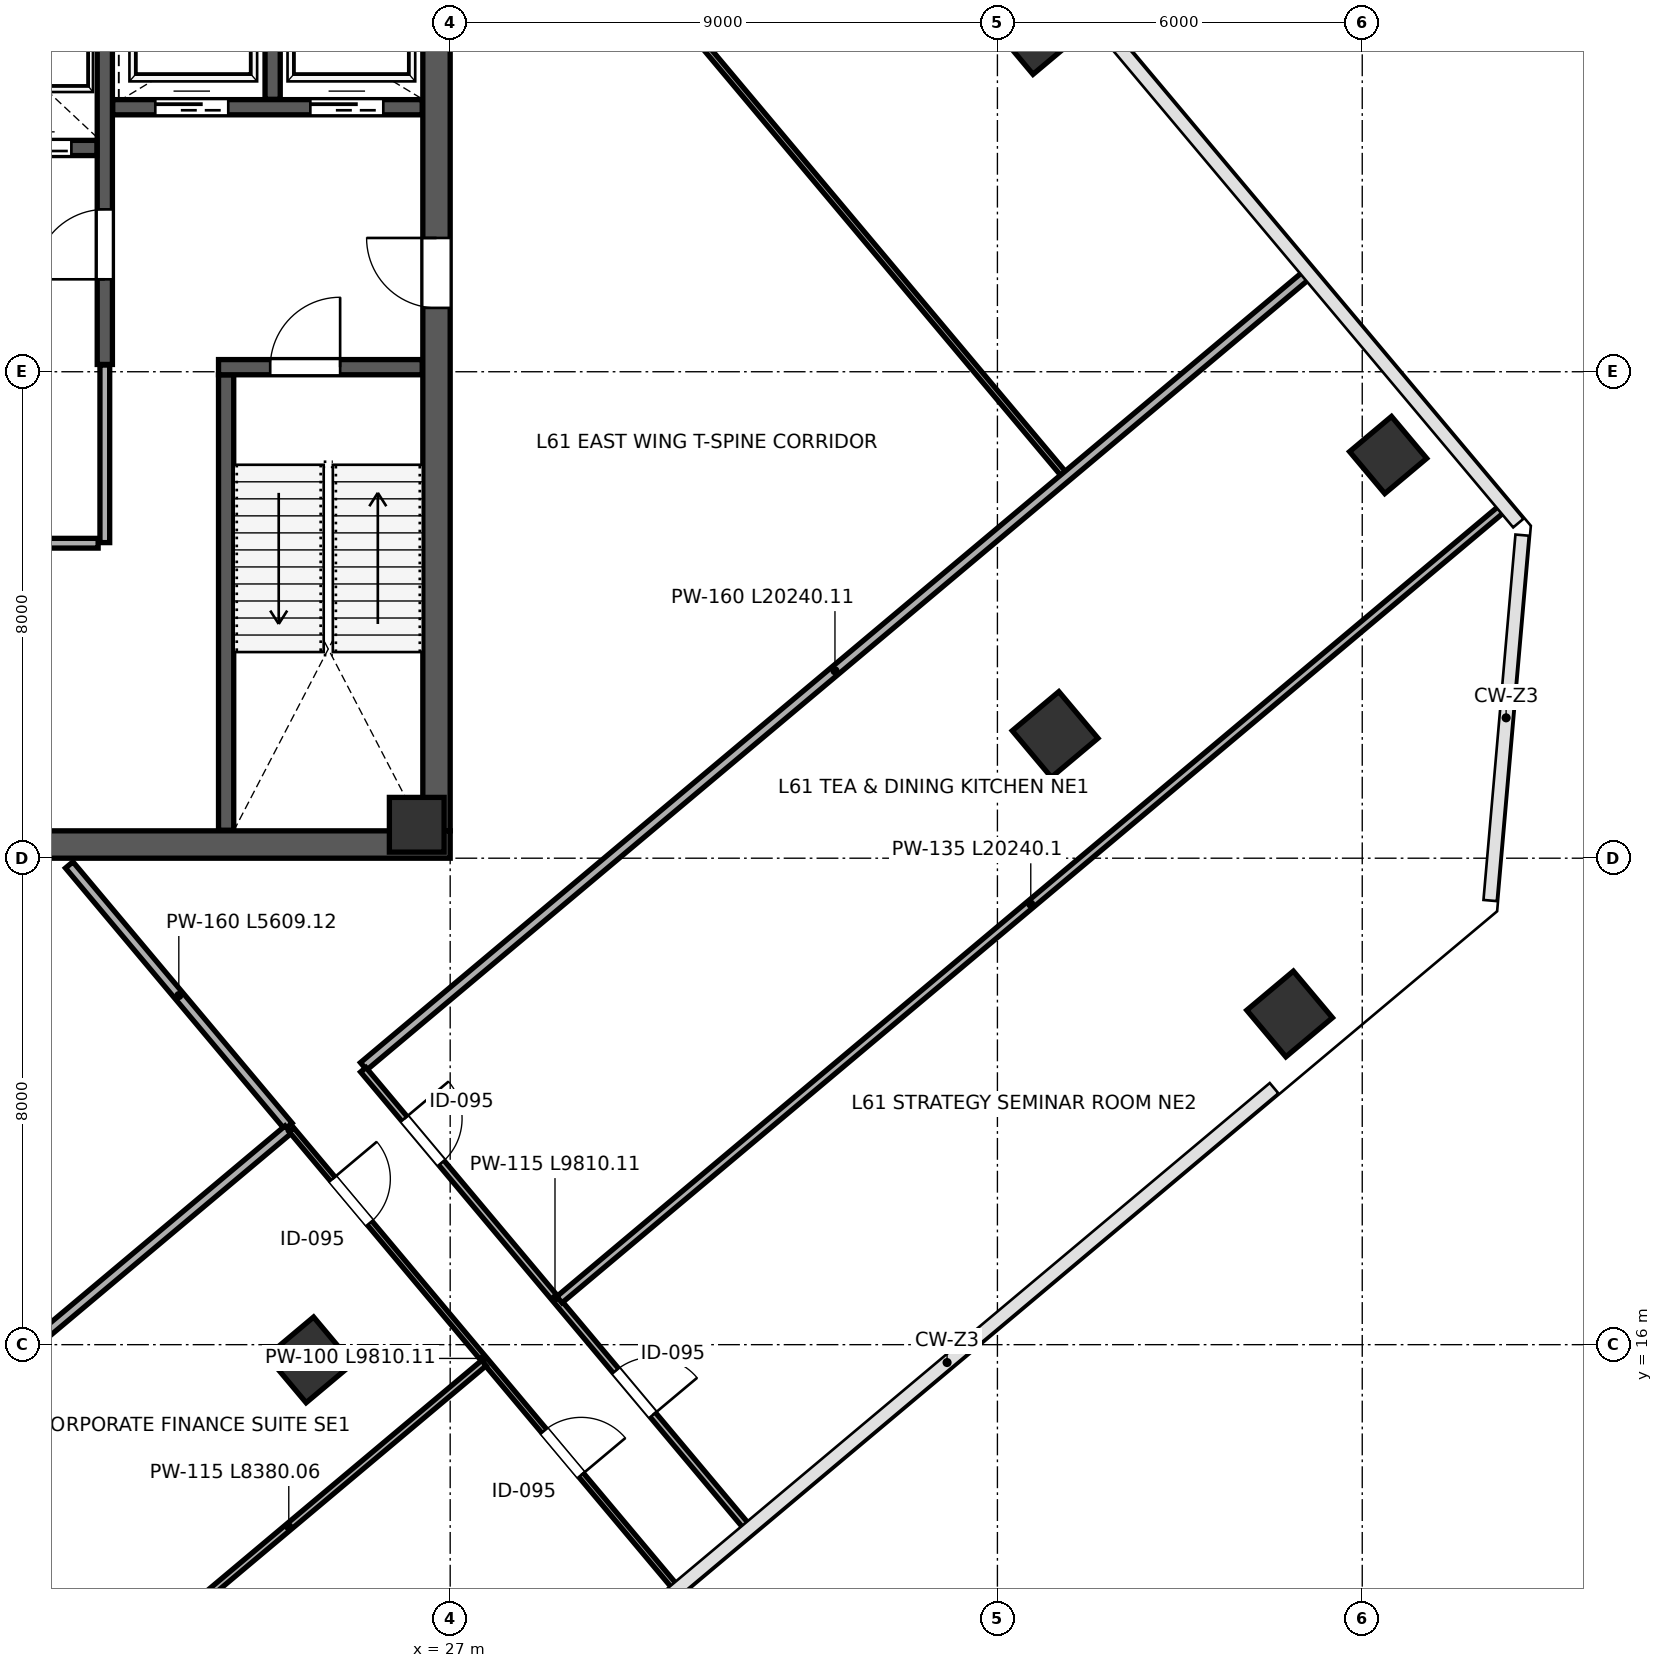
"""IFC4 building model, lengths in metres.
Left out: names, types, materials, properties, quantities, classifications, styles, units other than length and angle.
Written with IfcOpenShell. Run it as: python <this file> out.ifc"""

import sys

from ifc_helpers import new_model, si_unit, direction, frame, frame_2d, origin, origin_2d, place, context, subcontext, project, spatial, rectangle, extrude, source, transform, mapped, element, fill, save


model = new_model("IFC4")
c1 = context("Model", 3, precision=1e-05, world=origin(), true_north=direction((0.0, 1.0)))
c2 = subcontext(c1, "Body", "Model", "MODEL_VIEW")
j1 = project(units=[si_unit("LENGTHUNIT", "METRE"), si_unit("PLANEANGLEUNIT", "RADIAN")], contexts=[c1])
p1 = place(None, origin())
s1 = spatial("IfcSite", under=j1, at=p1, CompositionType="ELEMENT")
p2 = place(p1, origin())
s2 = spatial("IfcBuilding", under=s1, at=p2, CompositionType="ELEMENT")
p3 = place(p2, frame((0.0, 0.0, 271.0)))
s3 = spatial("IfcBuildingStorey", under=s2, at=p3, CompositionType="ELEMENT", Elevation=271.0)
m1 = source(origin(), c2, "Body", "SweptSolid", [
    extrude(rectangle(XDim=0.9, YDim=0.9, at=origin_2d()), origin(), (0.0, 0.0, 1.0), 4.198),
])
p4 = place(p3, frame((26.45, 24.55, 0.001), z_axis=(0.0, 0.0, 1.0), x_axis=(1.0, 0.0, 0.0)))
e1 = element("IfcColumn", 1, at=p4, inside=s3, PredefinedType="COLUMN", context=c2, shape_type="MappedRepresentation", body=[
    mapped(m1, transform((0.0, 0.0, 0.0), scale=1.0)),
])
m2 = source(origin(), c2, "Body", "SweptSolid", [
    extrude(rectangle(XDim=0.9, YDim=0.9, at=origin_2d()), origin(), (0.0, 0.0, 1.0), 4.198),
])
p5 = place(p3, frame((36.641, 37.525, 0.001), z_axis=(0.0, 0.0, 1.0), x_axis=(-0.642787609687, 0.766044443119, 0.0)))
e2 = element("IfcColumn", 2, at=p5, inside=s3, PredefinedType="COLUMN", context=c2, shape_type="MappedRepresentation", body=[
    mapped(m2, transform((0.0, 0.0, 0.0), scale=1.0)),
])
m3 = source(origin(), c2, "Body", "SweptSolid", [
    extrude(rectangle(XDim=1.0, YDim=1.0, at=origin_2d()), origin(), (0.0, 0.0, 1.0), 4.198),
])
for number, where, z_axis, x_axis in (
    (3, (24.692, 15.75, 0.001), (0.0, 0.0, 1.0), (-0.643, 0.766, 0.0)),
    (4, (36.949, 26.035, 0.001), (0.0, 0.0, 1.0), (-0.643, 0.766, 0.0)),
):
    element("IfcColumn", number, at=place(p3, frame(where, z_axis=z_axis, x_axis=x_axis)), inside=s3, PredefinedType="COLUMN", context=c2, shape_type="MappedRepresentation", body=[
        mapped(m3, transform((0.0, 0.0, 0.0), scale=1.0)),
    ])
p6 = place(p3, frame((42.426, 30.631, 0.001), z_axis=(0.0, 0.0, 1.0), x_axis=(-0.642787609687, 0.766044443119, 0.0)))
e5 = element("IfcColumn", 5, at=p6, inside=s3, PredefinedType="COLUMN", context=c2, shape_type="MappedRepresentation", body=[
    mapped(m2, transform((0.0, 0.0, 0.0), scale=1.0)),
])
m4 = source(origin(), c2, "Body", "SweptSolid", [
    extrude(rectangle(XDim=1.0, YDim=1.0, at=origin_2d()), origin(), (0.0, 0.0, 1.0), 4.198),
])
p7 = place(p3, frame((40.805, 21.438, 0.001), z_axis=(0.0, 0.0, 1.0), x_axis=(-0.642787609687, 0.766044443119, 0.0)))
e6 = element("IfcColumn", 6, at=p7, inside=s3, PredefinedType="COLUMN", context=c2, shape_type="MappedRepresentation", body=[
    mapped(m4, transform((0.0, 0.0, 0.0), scale=1.0)),
])
p8 = place(p3, frame((26.775, 24.45, 0.0), z_axis=(0.0, 0.0, 1.0), x_axis=(0.0, 1.0, 0.0)))
e7 = element("IfcWall", 7, at=p8, inside=s3, PredefinedType="SHEAR", context=c2, shape_type="SweptSolid", body=[
    extrude(rectangle(XDim=15.1, YDim=0.45, at=frame_2d((7.55, 0.0))), origin(), (0.0, 0.0, 1.0), 3.96),
])
p9 = place(p8, frame((8.6, 0.0, 0.0)))
e8 = element("IfcOpeningElement", 8, at=p9, cuts=e7, PredefinedType="OPENING", context=c2, shape_type="SweptSolid", body=[
    extrude(rectangle(XDim=1.15, YDim=2.2, at=frame_2d((0.575, 1.1))), frame((0.0, 0.235, 0.0), z_axis=(0.0, -1.0, 0.0), x_axis=(1.0, 0.0, 0.0)), (0.0, 0.0, 1.0), 0.47),
])
p10 = place(p3, frame((9.0, 24.225, 0.0), z_axis=(0.0, 0.0, 1.0), x_axis=(1.0, 0.0, 0.0)))
e9 = element("IfcWall", 9, at=p10, inside=s3, PredefinedType="SHEAR", context=c2, shape_type="SweptSolid", body=[
    extrude(rectangle(XDim=18.0, YDim=0.45, at=frame_2d((9.0, 0.0))), origin(), (0.0, 0.0, 1.0), 3.96),
])
p11 = place(p3, frame((23.315, 24.46, 0.0), z_axis=(0.0, 0.0, 1.0), x_axis=(0.0, 1.0, 0.0)))
e10 = element("IfcWall", 10, at=p11, inside=s3, PredefinedType="SHEAR", context=c2, shape_type="SweptSolid", body=[
    extrude(rectangle(XDim=7.49, YDim=0.25, at=frame_2d((3.745, 0.0))), origin(), (0.0, 0.0, 1.0), 3.96),
])
p12 = place(p3, frame((23.19, 32.075, 0.0), z_axis=(0.0, 0.0, 1.0), x_axis=(1.0, 0.0, 0.0)))
e11 = element("IfcWall", 11, at=p12, inside=s3, PredefinedType="SHEAR", context=c2, shape_type="SweptSolid", body=[
    extrude(rectangle(XDim=3.35, YDim=0.25, at=frame_2d((1.675, 0.0))), origin(), (0.0, 0.0, 1.0), 3.96),
])
p13 = place(p12, frame((0.85, 0.0, 0.0)))
e12 = element("IfcOpeningElement", 12, at=p13, cuts=e11, PredefinedType="OPENING", context=c2, shape_type="SweptSolid", body=[
    extrude(rectangle(XDim=1.15, YDim=2.2, at=frame_2d((0.575, 1.1))), frame((0.0, 0.135, 0.0), z_axis=(0.0, -1.0, 0.0), x_axis=(1.0, 0.0, 0.0)), (0.0, 0.0, 1.0), 0.27),
])
p14 = place(p3, frame((21.32, 32.12, 0.0), z_axis=(0.0, 0.0, 1.0), x_axis=(0.0, 1.0, 0.0)))
e13 = element("IfcWall", 13, at=p14, inside=s3, PredefinedType="SHEAR", context=c2, shape_type="SweptSolid", body=[
    extrude(rectangle(XDim=7.42, YDim=0.25, at=frame_2d((3.71, 0.0))), origin(), (0.0, 0.0, 1.0), 3.96),
])
p15 = place(p14, frame((1.4, 0.0, 0.0)))
e14 = element("IfcOpeningElement", 14, at=p15, cuts=e13, PredefinedType="OPENING", context=c2, shape_type="SweptSolid", body=[
    extrude(rectangle(XDim=1.15, YDim=2.2, at=frame_2d((0.575, 1.1))), frame((0.0, 0.135, 0.0), z_axis=(0.0, -1.0, 0.0), x_axis=(1.0, 0.0, 0.0)), (0.0, 0.0, 1.0), 0.27),
])
p16 = place(p3, frame((21.45, 36.35, 0.0), z_axis=(0.0, 0.0, 1.0), x_axis=(1.0, 0.0, 0.0)))
e15 = element("IfcWall", 15, at=p16, inside=s3, PredefinedType="SHEAR", context=c2, shape_type="SweptSolid", body=[
    extrude(rectangle(XDim=5.09, YDim=0.25, at=frame_2d((2.545, 0.0))), origin(), (0.0, 0.0, 1.0), 3.96),
])
p17 = place(p16, frame((0.7, 0.0, 0.0)))
e16 = element("IfcOpeningElement", 16, at=p17, cuts=e15, PredefinedType="OPENING", context=c2, shape_type="SweptSolid", body=[
    extrude(rectangle(XDim=1.2, YDim=2.2, at=frame_2d((0.6, 1.1))), frame((0.0, 0.135, 0.0), z_axis=(0.0, -1.0, 0.0), x_axis=(1.0, 0.0, 0.0)), (0.0, 0.0, 1.0), 0.27),
])
p18 = place(p16, frame((3.25, 0.0, 0.0)))
e17 = element("IfcOpeningElement", 17, at=p18, cuts=e15, PredefinedType="OPENING", context=c2, shape_type="SweptSolid", body=[
    extrude(rectangle(XDim=1.2, YDim=2.2, at=frame_2d((0.6, 1.1))), frame((0.0, 0.135, 0.0), z_axis=(0.0, -1.0, 0.0), x_axis=(1.0, 0.0, 0.0)), (0.0, 0.0, 1.0), 0.27),
])
p19 = place(p3, frame((24.08, 36.48, 0.0), z_axis=(0.0, 0.0, 1.0), x_axis=(0.0, 1.0, 0.0)))
e18 = element("IfcWall", 18, at=p19, inside=s3, PredefinedType="SHEAR", context=c2, shape_type="SweptSolid", body=[
    extrude(rectangle(XDim=3.06, YDim=0.25, at=frame_2d((1.53, 0.0))), origin(), (0.0, 0.0, 1.0), 3.96),
])
p20 = place(p3, frame((17.32, 35.68, 0.0), z_axis=(0.0, 0.0, 1.0), x_axis=(1.0, 0.0, 0.0)))
e19 = element("IfcWall", 19, at=p20, inside=s3, PredefinedType="SHEAR", context=c2, shape_type="SweptSolid", body=[
    extrude(rectangle(XDim=3.87, YDim=0.25, at=frame_2d((1.935, 0.0))), origin(), (0.0, 0.0, 1.0), 3.96),
])
p21 = place(p20, frame((0.45, 0.0, 0.0)))
e20 = element("IfcOpeningElement", 20, at=p21, cuts=e19, PredefinedType="OPENING", context=c2, shape_type="SweptSolid", body=[
    extrude(rectangle(XDim=1.1, YDim=2.2, at=frame_2d((0.55, 1.1))), frame((0.0, 0.135, 0.0), z_axis=(0.0, -1.0, 0.0), x_axis=(1.0, 0.0, 0.0)), (0.0, 0.0, 1.0), 0.27),
])
p22 = place(p20, frame((2.35, 0.0, 0.0)))
e21 = element("IfcOpeningElement", 21, at=p22, cuts=e19, PredefinedType="OPENING", context=c2, shape_type="SweptSolid", body=[
    extrude(rectangle(XDim=1.1, YDim=2.2, at=frame_2d((0.55, 1.1))), frame((0.0, 0.135, 0.0), z_axis=(0.0, -1.0, 0.0), x_axis=(1.0, 0.0, 0.0)), (0.0, 0.0, 1.0), 0.27),
])
p23 = place(p3, frame((12.84, 29.18, 0.0), z_axis=(0.0, 0.0, 1.0), x_axis=(1.0, 0.0, 0.0)))
e22 = element("IfcWall", 22, at=p23, inside=s3, PredefinedType="PARTITIONING", context=c2, shape_type="SweptSolid", body=[
    extrude(rectangle(XDim=8.37, YDim=0.16, at=frame_2d((4.185, 0.0))), origin(), (0.0, 0.0, 1.0), 3.96),
])
p24 = place(p23, frame((2.1, 0.0, 0.0)))
e23 = element("IfcOpeningElement", 23, at=p24, cuts=e22, PredefinedType="OPENING", context=c2, shape_type="SweptSolid", body=[
    extrude(rectangle(XDim=0.9, YDim=2.15, at=frame_2d((0.45, 1.075))), frame((0.0, 0.09, 0.0), z_axis=(0.0, -1.0, 0.0), x_axis=(1.0, 0.0, 0.0)), (0.0, 0.0, 1.0), 0.18),
])
p25 = place(p23, frame((6.2, 0.0, 0.0)))
e24 = element("IfcOpeningElement", 24, at=p25, cuts=e22, PredefinedType="OPENING", context=c2, shape_type="SweptSolid", body=[
    extrude(rectangle(XDim=0.85, YDim=2.1, at=frame_2d((0.425, 1.05))), frame((0.0, 0.09, 0.0), z_axis=(0.0, -1.0, 0.0), x_axis=(1.0, 0.0, 0.0)), (0.0, 0.0, 1.0), 0.18),
])
p26 = place(p3, frame((21.32, 29.19, 0.0), z_axis=(0.0, 0.0, 1.0), x_axis=(0.0, 1.0, 0.0)))
e25 = element("IfcWall", 25, at=p26, inside=s3, PredefinedType="PARTITIONING", context=c2, shape_type="SweptSolid", body=[
    extrude(rectangle(XDim=2.92, YDim=0.16, at=frame_2d((1.46, 0.0))), origin(), (0.0, 0.0, 1.0), 3.96),
])
p27 = place(p3, frame((20.734, 23.889, 0.0), z_axis=(0.0, 0.0, 1.0), x_axis=(0.642758145725, -0.766069165353, 0.0)))
e26 = element("IfcWall", 26, at=p27, inside=s3, PredefinedType="PARTITIONING", context=c2, shape_type="SweptSolid", body=[
    extrude(rectangle(XDim=5.609, YDim=0.16, at=frame_2d((2.804, 0.0))), origin(), (0.0, 0.0, 1.0), 3.96),
])
p28 = place(p3, frame((19.528, 51.245, 0.0), z_axis=(0.0, 0.0, 1.0), x_axis=(0.642782364439, -0.766048844374, 0.0)))
e27 = element("IfcWall", 27, at=p28, inside=s3, PredefinedType="PARTITIONING", context=c2, shape_type="SweptSolid", body=[
    extrude(rectangle(XDim=27.34, YDim=0.1, at=frame_2d((13.67, 0.0))), origin(), (0.0, 0.0, 1.0), 3.96),
])
p29 = place(p28, frame((10.8, 0.0, 0.0)))
e28 = element("IfcOpeningElement", 28, at=p29, cuts=e27, PredefinedType="OPENING", context=c2, shape_type="SweptSolid", body=[
    extrude(rectangle(XDim=0.95, YDim=2.15, at=frame_2d((0.475, 1.075))), frame((0.0, 0.06, 0.0), z_axis=(0.0, -1.0, 0.0), x_axis=(1.0, 0.0, 0.0)), (0.0, 0.0, 1.0), 0.12),
])
p30 = place(p3, frame((0.849, 35.624, 0.0), z_axis=(0.0, 0.0, 1.0), x_axis=(0.766042777978, 0.642789594119, 0.0)))
e29 = element("IfcWall", 29, at=p30, inside=s3, PredefinedType="PARTITIONING", context=c2, shape_type="SweptSolid", body=[
    extrude(rectangle(XDim=29.51, YDim=0.115, at=frame_2d((14.755, 0.0))), origin(), (0.0, 0.0, 1.0), 3.96),
])
p31 = place(p30, frame((2.6, 0.0, 0.0)))
e30 = element("IfcOpeningElement", 30, at=p31, cuts=e29, PredefinedType="OPENING", context=c2, shape_type="SweptSolid", body=[
    extrude(rectangle(XDim=0.95, YDim=2.15, at=frame_2d((0.475, 1.075))), frame((0.0, 0.067, 0.0), z_axis=(0.0, -1.0, 0.0), x_axis=(1.0, 0.0, 0.0)), (0.0, 0.0, 1.0), 0.135),
])
p32 = place(p3, frame((25.576, 20.577, 0.0), z_axis=(0.0, 0.0, 1.0), x_axis=(0.76604764673, 0.642783791752, 0.0)))
e31 = element("IfcWall", 31, at=p32, inside=s3, PredefinedType="PARTITIONING", context=c2, shape_type="SweptSolid", body=[
    extrude(rectangle(XDim=20.24, YDim=0.16, at=frame_2d((10.12, 0.0))), origin(), (0.0, 0.0, 1.0), 3.195),
])
p33 = place(p3, frame((16.711, 13.139, 0.0), z_axis=(0.0, 0.0, 1.0), x_axis=(0.766041122188, 0.642791567398, 0.0)))
e32 = element("IfcWall", 32, at=p33, inside=s3, PredefinedType="PARTITIONING", context=c2, shape_type="SweptSolid", body=[
    extrude(rectangle(XDim=9.952, YDim=0.16, at=frame_2d((4.976, 0.0))), origin(), (0.0, 0.0, 1.0), 3.96),
])
p34 = place(p3, frame((25.571, 20.521, 0.0), z_axis=(0.0, 0.0, 1.0), x_axis=(0.64278520229, -0.766046463158, 0.0)))
e33 = element("IfcWall", 33, at=p34, inside=s3, PredefinedType="PARTITIONING", context=c2, shape_type="SweptSolid", body=[
    extrude(rectangle(XDim=9.81, YDim=0.115, at=frame_2d((4.905, 0.0))), origin(), (0.0, 0.0, 1.0), 3.96),
])
p35 = place(p34, frame((1.05, 0.0, 0.0)))
e34 = element("IfcOpeningElement", 34, at=p35, cuts=e33, PredefinedType="OPENING", context=c2, shape_type="SweptSolid", body=[
    extrude(rectangle(XDim=0.95, YDim=2.15, at=frame_2d((0.475, 1.075))), frame((0.0, 0.067, 0.0), z_axis=(0.0, -1.0, 0.0), x_axis=(1.0, 0.0, 0.0)), (0.0, 0.0, 1.0), 0.135),
])
p36 = place(p34, frame((6.46, 0.0, 0.0)))
e35 = element("IfcOpeningElement", 35, at=p36, cuts=e33, PredefinedType="OPENING", context=c2, shape_type="SweptSolid", body=[
    extrude(rectangle(XDim=0.95, YDim=2.15, at=frame_2d((0.475, 1.075))), frame((0.0, 0.067, 0.0), z_axis=(0.0, -1.0, 0.0), x_axis=(1.0, 0.0, 0.0)), (0.0, 0.0, 1.0), 0.135),
])
p37 = place(p3, frame((24.391, 19.531, 0.0), z_axis=(0.0, 0.0, 1.0), x_axis=(0.642797456481, -0.76603618057, 0.0)))
e36 = element("IfcWall", 36, at=p37, inside=s3, PredefinedType="PARTITIONING", context=c2, shape_type="SweptSolid", body=[
    extrude(rectangle(XDim=9.81, YDim=0.1, at=frame_2d((4.905, 0.0))), origin(), (0.0, 0.0, 1.0), 3.96),
])
p38 = place(p37, frame((1.05, 0.0, 0.0)))
e37 = element("IfcOpeningElement", 37, at=p38, cuts=e36, PredefinedType="OPENING", context=c2, shape_type="SweptSolid", body=[
    extrude(rectangle(XDim=0.95, YDim=2.15, at=frame_2d((0.475, 1.075))), frame((0.0, 0.06, 0.0), z_axis=(0.0, -1.0, 0.0), x_axis=(1.0, 0.0, 0.0)), (0.0, 0.0, 1.0), 0.12),
])
p39 = place(p37, frame((6.46, 0.0, 0.0)))
e38 = element("IfcOpeningElement", 38, at=p39, cuts=e36, PredefinedType="OPENING", context=c2, shape_type="SweptSolid", body=[
    extrude(rectangle(XDim=0.95, YDim=2.15, at=frame_2d((0.475, 1.075))), frame((0.0, 0.06, 0.0), z_axis=(0.0, -1.0, 0.0), x_axis=(1.0, 0.0, 0.0)), (0.0, 0.0, 1.0), 0.12),
])
p40 = place(p3, frame((28.796, 16.74, 0.0), z_axis=(0.0, 0.0, 1.0), x_axis=(0.766036723368, 0.642796809616, 0.0)))
e39 = element("IfcWall", 39, at=p40, inside=s3, PredefinedType="PARTITIONING", context=c2, shape_type="SweptSolid", body=[
    extrude(rectangle(XDim=20.24, YDim=0.135, at=frame_2d((10.12, 0.0))), origin(), (0.0, 0.0, 1.0), 3.96),
])
p41 = place(p3, frame((21.136, 10.312, 0.0), z_axis=(0.0, 0.0, 1.0), x_axis=(0.766048541695, 0.642782725162, 0.0)))
e40 = element("IfcWall", 40, at=p41, inside=s3, PredefinedType="PARTITIONING", context=c2, shape_type="SweptSolid", body=[
    extrude(rectangle(XDim=8.38, YDim=0.115, at=frame_2d((4.19, 0.0))), origin(), (0.0, 0.0, 1.0), 3.96),
])
m5 = source(origin(), c2, "Body", "SweptSolid", [
    extrude(rectangle(XDim=1.15, YDim=2.2, at=frame_2d((0.575, 1.1))), frame((0.0, 0.025, 0.0), z_axis=(0.0, -1.0, 0.0), x_axis=(1.0, 0.0, 0.0)), (0.0, 0.0, 1.0), 0.05),
])
p42 = place(p15, origin())
e41 = element("IfcDoor", 41, at=p42, inside=s3, OperationType="SINGLE_SWING_LEFT", PredefinedType="DOOR", context=c2, shape_type="MappedRepresentation", body=[
    mapped(m5, transform((0.0, 0.0, 0.0), scale=1.0)),
])
fill(e14, e41)
m6 = source(origin(), c2, "Body", "SweptSolid", [
    extrude(rectangle(XDim=1.15, YDim=2.2, at=frame_2d((0.575, 1.1))), frame((0.0, 0.025, 0.0), z_axis=(0.0, -1.0, 0.0), x_axis=(1.0, 0.0, 0.0)), (0.0, 0.0, 1.0), 0.05),
])
p43 = place(p13, origin())
e42 = element("IfcDoor", 42, at=p43, inside=s3, OperationType="SINGLE_SWING_RIGHT", PredefinedType="DOOR", context=c2, shape_type="MappedRepresentation", body=[
    mapped(m6, transform((0.0, 0.0, 0.0), scale=1.0)),
])
fill(e12, e42)
p44 = place(p9, origin())
e43 = element("IfcDoor", 43, at=p44, inside=s3, OperationType="SINGLE_SWING_RIGHT", PredefinedType="DOOR", context=c2, shape_type="MappedRepresentation", body=[
    mapped(m5, transform((0.0, 0.0, 0.0), scale=1.0)),
])
fill(e8, e43)
m7 = source(origin(), c2, "Body", "SweptSolid", [
    extrude(rectangle(XDim=1.1, YDim=2.2, at=frame_2d((0.55, 1.1))), frame((0.0, 0.025, 0.0), z_axis=(0.0, -1.0, 0.0), x_axis=(1.0, 0.0, 0.0)), (0.0, 0.0, 1.0), 0.05),
])
p45 = place(p22, origin())
e44 = element("IfcDoor", 44, at=p45, inside=s3, OperationType="SLIDING_TO_RIGHT", PredefinedType="DOOR", context=c2, shape_type="MappedRepresentation", body=[
    mapped(m7, transform((0.0, 0.0, 0.0), scale=1.0)),
])
fill(e21, e44)
m8 = source(origin(), c2, "Body", "SweptSolid", [
    extrude(rectangle(XDim=1.2, YDim=2.2, at=frame_2d((0.6, 1.1))), frame((0.0, 0.025, 0.0), z_axis=(0.0, -1.0, 0.0), x_axis=(1.0, 0.0, 0.0)), (0.0, 0.0, 1.0), 0.05),
])
p46 = place(p17, origin())
e45 = element("IfcDoor", 45, at=p46, inside=s3, OperationType="SLIDING_TO_LEFT", PredefinedType="DOOR", context=c2, shape_type="MappedRepresentation", body=[
    mapped(m8, transform((0.0, 0.0, 0.0), scale=1.0)),
])
fill(e16, e45)
p47 = place(p18, origin())
e46 = element("IfcDoor", 46, at=p47, inside=s3, OperationType="SLIDING_TO_RIGHT", PredefinedType="DOOR", context=c2, shape_type="MappedRepresentation", body=[
    mapped(m8, transform((0.0, 0.0, 0.0), scale=1.0)),
])
fill(e17, e46)
m9 = source(origin(), c2, "Body", "SweptSolid", [
    extrude(rectangle(XDim=0.95, YDim=2.15, at=frame_2d((0.475, 1.075))), frame((0.0, 0.025, 0.0), z_axis=(0.0, -1.0, 0.0), x_axis=(1.0, 0.0, 0.0)), (0.0, 0.0, 1.0), 0.05),
])
p48 = place(p35, origin())
e47 = element("IfcDoor", 47, at=p48, inside=s3, OperationType="SINGLE_SWING_LEFT", PredefinedType="DOOR", context=c2, shape_type="MappedRepresentation", body=[
    mapped(m9, transform((0.0, 0.0, 0.0), scale=1.0)),
])
fill(e34, e47)
p49 = place(p36, origin())
e48 = element("IfcDoor", 48, at=p49, inside=s3, OperationType="SINGLE_SWING_RIGHT", PredefinedType="DOOR", context=c2, shape_type="MappedRepresentation", body=[
    mapped(m9, transform((0.0, 0.0, 0.0), scale=1.0)),
])
fill(e35, e48)
p50 = place(p38, origin())
e49 = element("IfcDoor", 49, at=p50, inside=s3, OperationType="SINGLE_SWING_LEFT", PredefinedType="DOOR", context=c2, shape_type="MappedRepresentation", body=[
    mapped(m9, transform((0.0, 0.0, 0.0), scale=1.0)),
])
fill(e37, e49)
p51 = place(p39, origin())
e50 = element("IfcDoor", 50, at=p51, inside=s3, OperationType="SINGLE_SWING_RIGHT", PredefinedType="DOOR", context=c2, shape_type="MappedRepresentation", body=[
    mapped(m9, transform((0.0, 0.0, 0.0), scale=1.0)),
])
fill(e38, e50)
save(model, sys.argv[1])
